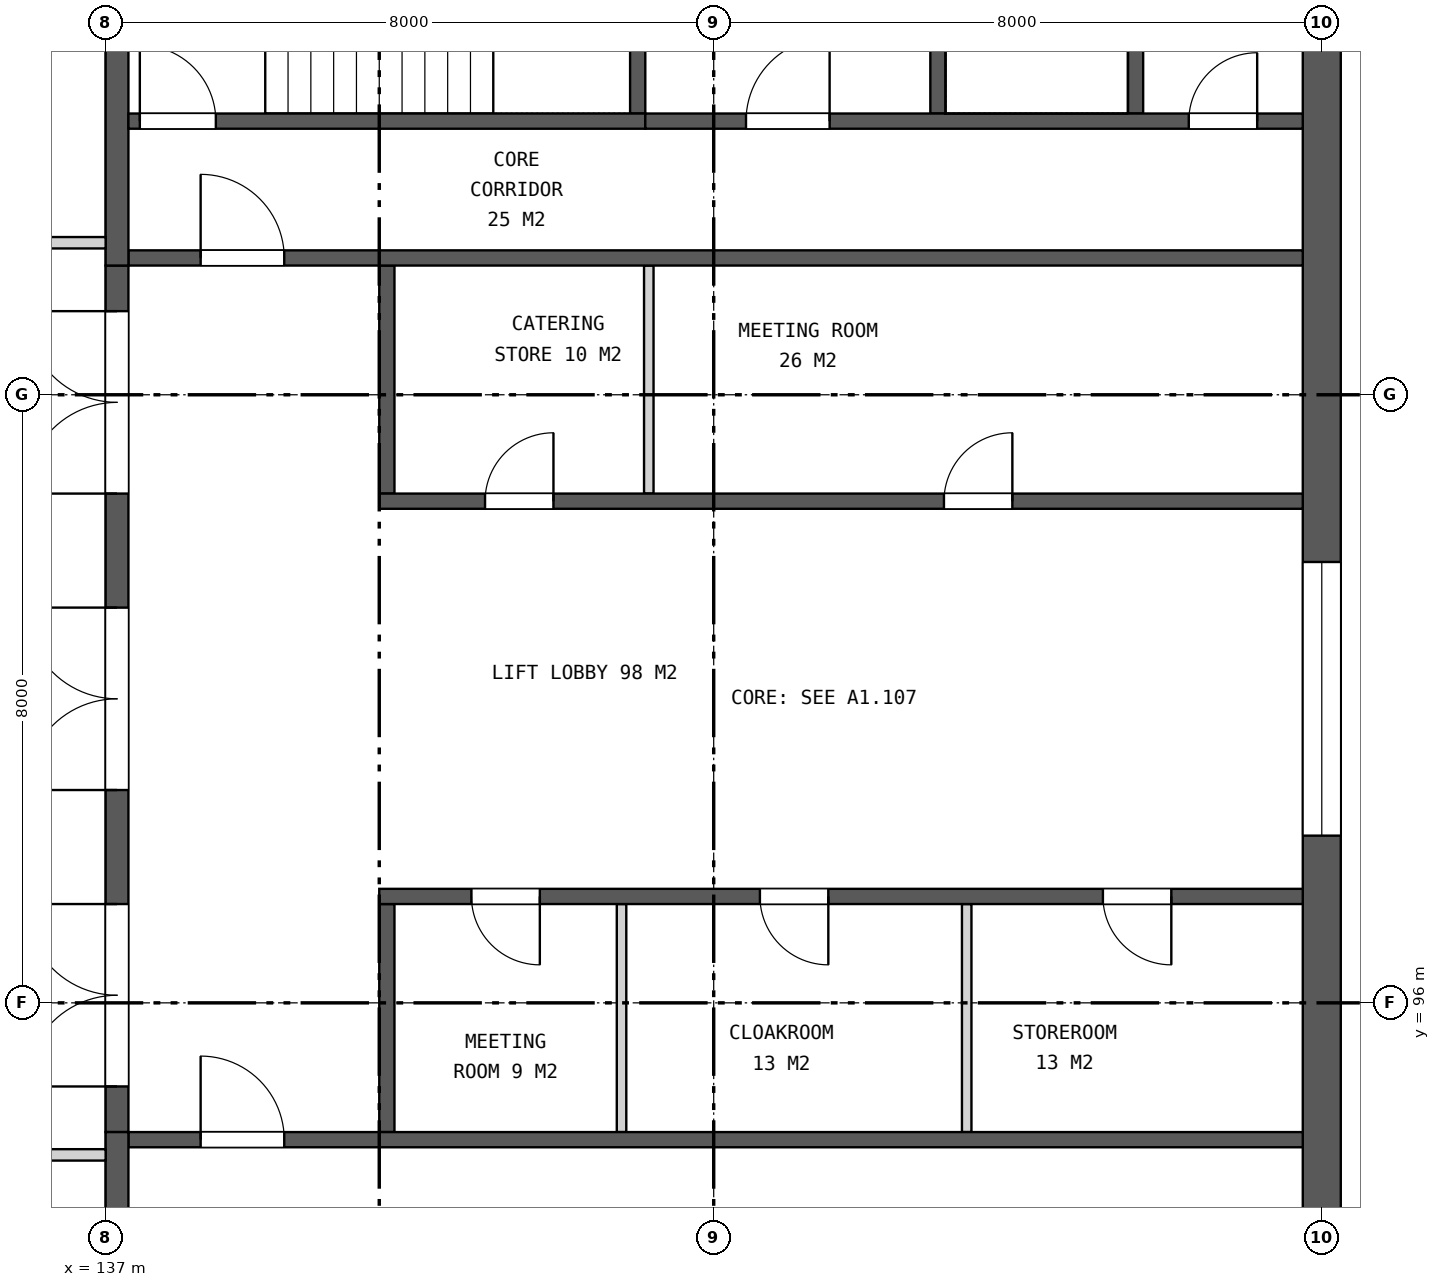
"""IFC4 building model, lengths in metres.
Left out: names, types, materials, properties, quantities, classifications, styles, units other than length and angle.
Written with IfcOpenShell. Run it as: python <this file> out.ifc"""

import sys

from ifc_helpers import new_model, si_unit, direction, frame, frame_2d, origin, place, context, subcontext, project, spatial, rectangle, extrude, element, fill, save


model = new_model("IFC4")
c1 = context("Model", 3, precision=1e-05, world=origin(), true_north=direction((0.0, 1.0)))
c2 = subcontext(c1, "Body", "Model", "MODEL_VIEW")
j1 = project(units=[si_unit("LENGTHUNIT", "METRE"), si_unit("PLANEANGLEUNIT", "RADIAN")], contexts=[c1])
p1 = place(None, origin())
s1 = spatial("IfcSite", under=j1, at=p1, CompositionType="ELEMENT")
p2 = place(p1, origin())
s2 = spatial("IfcBuilding", under=s1, at=p2, CompositionType="ELEMENT")
p3 = place(p2, frame((0.0, 0.0, 344.9)))
s3 = spatial("IfcBuildingStorey", under=s2, at=p3, CompositionType="ELEMENT", Elevation=344.9)
p4 = place(p3, frame((153.0, 88.25, 0.0), z_axis=(0.0, 0.0, 1.0), x_axis=(0.0, 1.0, 0.0)))
e1 = element("IfcWall", 1, at=p4, inside=s3, PredefinedType="SHEAR", context=c2, shape_type="SweptSolid", body=[
    extrude(rectangle(XDim=23.5, YDim=0.5, at=frame_2d((11.75, 0.0))), origin(), (0.0, 0.0, 1.0), 4.2),
])
p5 = place(p4, frame((9.95, 0.0, 0.15)))
e2 = element("IfcOpeningElement", 2, at=p5, cuts=e1, PredefinedType="OPENING", context=c2, shape_type="SweptSolid", body=[
    extrude(rectangle(XDim=3.6, YDim=3.0, at=frame_2d((1.8, 1.5))), frame((0.0, 0.26, 0.0), z_axis=(0.0, -1.0, 0.0), x_axis=(1.0, 0.0, 0.0)), (0.0, 0.0, 1.0), 0.52),
])
p6 = place(p3, frame((137.15, 94.3, 0.0), z_axis=(0.0, 0.0, 1.0), x_axis=(0.0, 1.0, 0.0)))
e3 = element("IfcWall", 3, at=p6, inside=s3, PredefinedType="SHEAR", context=c2, shape_type="SweptSolid", body=[
    extrude(rectangle(XDim=11.4, YDim=0.3, at=frame_2d((5.7, 0.0))), origin(), (0.0, 0.0, 1.0), 4.2),
])
p7 = place(p6, frame((0.6, 0.0, 0.0)))
e4 = element("IfcOpeningElement", 4, at=p7, cuts=e3, PredefinedType="OPENING", context=c2, shape_type="SweptSolid", body=[
    extrude(rectangle(XDim=2.4, YDim=2.4, at=frame_2d((1.2, 1.2))), frame((0.0, 0.16, 0.0), z_axis=(0.0, -1.0, 0.0), x_axis=(1.0, 0.0, 0.0)), (0.0, 0.0, 1.0), 0.32),
])
p8 = place(p6, frame((4.5, 0.0, 0.0)))
e5 = element("IfcOpeningElement", 5, at=p8, cuts=e3, PredefinedType="OPENING", context=c2, shape_type="SweptSolid", body=[
    extrude(rectangle(XDim=2.4, YDim=2.4, at=frame_2d((1.2, 1.2))), frame((0.0, 0.16, 0.0), z_axis=(0.0, -1.0, 0.0), x_axis=(1.0, 0.0, 0.0)), (0.0, 0.0, 1.0), 0.32),
])
p9 = place(p6, frame((8.4, 0.0, 0.0)))
e6 = element("IfcOpeningElement", 6, at=p9, cuts=e3, PredefinedType="OPENING", context=c2, shape_type="SweptSolid", body=[
    extrude(rectangle(XDim=2.4, YDim=2.4, at=frame_2d((1.2, 1.2))), frame((0.0, 0.16, 0.0), z_axis=(0.0, -1.0, 0.0), x_axis=(1.0, 0.0, 0.0)), (0.0, 0.0, 1.0), 0.32),
])
p10 = place(p3, frame((140.7, 102.7, 0.0), z_axis=(0.0, 0.0, 1.0), x_axis=(0.0, 1.0, 0.0)))
e7 = element("IfcWall", 7, at=p10, inside=s3, PredefinedType="SHEAR", context=c2, shape_type="SweptSolid", body=[
    extrude(rectangle(XDim=3.0, YDim=0.2, at=frame_2d((1.5, 0.0))), origin(), (0.0, 0.0, 1.0), 4.2),
])
p11 = place(p3, frame((144.146, 102.7, 0.0), z_axis=(0.0, 0.0, 1.0), x_axis=(0.0, 1.0, 0.0)))
e8 = element("IfcWall", 8, at=p11, inside=s3, PredefinedType="PARTITIONING", context=c2, shape_type="SweptSolid", body=[
    extrude(rectangle(XDim=3.0, YDim=0.125, at=frame_2d((1.5, 0.0))), origin(), (0.0, 0.0, 1.0), 4.2),
])
p12 = place(p3, frame((140.6, 102.6, 0.0), z_axis=(0.0, 0.0, 1.0), x_axis=(1.0, 0.0, 0.0)))
e9 = element("IfcWall", 9, at=p12, inside=s3, PredefinedType="SHEAR", context=c2, shape_type="SweptSolid", body=[
    extrude(rectangle(XDim=12.15, YDim=0.2, at=frame_2d((6.075, 0.0))), origin(), (0.0, 0.0, 1.0), 4.2),
])
p13 = place(p12, frame((1.392, 0.0, 0.0)))
e10 = element("IfcOpeningElement", 10, at=p13, cuts=e9, PredefinedType="OPENING", context=c2, shape_type="SweptSolid", body=[
    extrude(rectangle(XDim=0.9, YDim=2.1, at=frame_2d((0.45, 1.05))), frame((0.0, 0.11, 0.0), z_axis=(0.0, -1.0, 0.0), x_axis=(1.0, 0.0, 0.0)), (0.0, 0.0, 1.0), 0.22),
])
p14 = place(p12, frame((7.429, 0.0, 0.0)))
e11 = element("IfcOpeningElement", 11, at=p14, cuts=e9, PredefinedType="OPENING", context=c2, shape_type="SweptSolid", body=[
    extrude(rectangle(XDim=0.9, YDim=2.1, at=frame_2d((0.45, 1.05))), frame((0.0, 0.11, 0.0), z_axis=(0.0, -1.0, 0.0), x_axis=(1.0, 0.0, 0.0)), (0.0, 0.0, 1.0), 0.22),
])
p15 = place(p3, frame((140.7, 94.3, 0.0), z_axis=(0.0, 0.0, 1.0), x_axis=(0.0, 1.0, 0.0)))
e12 = element("IfcWall", 12, at=p15, inside=s3, PredefinedType="SHEAR", context=c2, shape_type="SweptSolid", body=[
    extrude(rectangle(XDim=3.0, YDim=0.2, at=frame_2d((1.5, 0.0))), origin(), (0.0, 0.0, 1.0), 4.2),
])
for number, where, z_axis, x_axis in (
    (13, (143.788, 94.3, 0.0), (0.0, 0.0, 1.0), (0.0, 1.0, 0.0)),
    (14, (148.329, 94.3, 0.0), (0.0, 0.0, 1.0), (0.0, 1.0, 0.0)),
):
    element("IfcWall", number, at=place(p3, frame(where, z_axis=z_axis, x_axis=x_axis)), inside=s3, PredefinedType="PARTITIONING", context=c2, shape_type="SweptSolid", body=[
        extrude(rectangle(XDim=3.0, YDim=0.125, at=frame_2d((1.5, 0.0))), origin(), (0.0, 0.0, 1.0), 4.2),
    ])
p16 = place(p3, frame((140.6, 97.4, 0.0), z_axis=(0.0, 0.0, 1.0), x_axis=(1.0, 0.0, 0.0)))
e15 = element("IfcWall", 15, at=p16, inside=s3, PredefinedType="SHEAR", context=c2, shape_type="SweptSolid", body=[
    extrude(rectangle(XDim=12.15, YDim=0.2, at=frame_2d((6.075, 0.0))), origin(), (0.0, 0.0, 1.0), 4.2),
])
p17 = place(p16, frame((1.212, 0.0, 0.0)))
e16 = element("IfcOpeningElement", 16, at=p17, cuts=e15, PredefinedType="OPENING", context=c2, shape_type="SweptSolid", body=[
    extrude(rectangle(XDim=0.9, YDim=2.1, at=frame_2d((0.45, 1.05))), frame((0.0, 0.11, 0.0), z_axis=(0.0, -1.0, 0.0), x_axis=(1.0, 0.0, 0.0)), (0.0, 0.0, 1.0), 0.22),
])
p18 = place(p16, frame((5.008, 0.0, 0.0)))
e17 = element("IfcOpeningElement", 17, at=p18, cuts=e15, PredefinedType="OPENING", context=c2, shape_type="SweptSolid", body=[
    extrude(rectangle(XDim=0.9, YDim=2.1, at=frame_2d((0.45, 1.05))), frame((0.0, 0.11, 0.0), z_axis=(0.0, -1.0, 0.0), x_axis=(1.0, 0.0, 0.0)), (0.0, 0.0, 1.0), 0.22),
])
p19 = place(p16, frame((9.521, 0.0, 0.0)))
e18 = element("IfcOpeningElement", 18, at=p19, cuts=e15, PredefinedType="OPENING", context=c2, shape_type="SweptSolid", body=[
    extrude(rectangle(XDim=0.9, YDim=2.1, at=frame_2d((0.45, 1.05))), frame((0.0, 0.11, 0.0), z_axis=(0.0, -1.0, 0.0), x_axis=(1.0, 0.0, 0.0)), (0.0, 0.0, 1.0), 0.22),
])
p20 = place(p3, frame((137.3, 105.8, 0.0), z_axis=(0.0, 0.0, 1.0), x_axis=(1.0, 0.0, 0.0)))
e19 = element("IfcWall", 19, at=p20, inside=s3, PredefinedType="SHEAR", context=c2, shape_type="SweptSolid", body=[
    extrude(rectangle(XDim=15.45, YDim=0.2, at=frame_2d((7.725, 0.0))), origin(), (0.0, 0.0, 1.0), 4.2),
])
p21 = place(p20, frame((0.95, 0.0, 0.0)))
e20 = element("IfcOpeningElement", 20, at=p21, cuts=e19, PredefinedType="OPENING", context=c2, shape_type="SweptSolid", body=[
    extrude(rectangle(XDim=1.1, YDim=2.1, at=frame_2d((0.55, 1.05))), frame((0.0, 0.11, 0.0), z_axis=(0.0, -1.0, 0.0), x_axis=(1.0, 0.0, 0.0)), (0.0, 0.0, 1.0), 0.22),
])
p22 = place(p3, frame((137.15, 105.7, 0.0), z_axis=(0.0, 0.0, 1.0), x_axis=(0.0, 1.0, 0.0)))
e21 = element("IfcWall", 21, at=p22, inside=s3, PredefinedType="SHEAR", context=c2, shape_type="SweptSolid", body=[
    extrude(rectangle(XDim=6.05, YDim=0.3, at=frame_2d((3.025, 0.0))), origin(), (0.0, 0.0, 1.0), 4.2),
])
p23 = place(p3, frame((144.0, 107.7, 0.0), z_axis=(0.0, 0.0, 1.0), x_axis=(0.0, 1.0, 0.0)))
e22 = element("IfcWall", 22, at=p23, inside=s3, PredefinedType="SHEAR", context=c2, shape_type="SweptSolid", body=[
    extrude(rectangle(XDim=4.05, YDim=0.2, at=frame_2d((2.025, 0.0))), origin(), (0.0, 0.0, 1.0), 4.2),
])
p24 = place(p3, frame((147.95, 107.7, 0.0), z_axis=(0.0, 0.0, 1.0), x_axis=(0.0, 1.0, 0.0)))
e23 = element("IfcWall", 23, at=p24, inside=s3, PredefinedType="SHEAR", context=c2, shape_type="SweptSolid", body=[
    extrude(rectangle(XDim=4.05, YDim=0.2, at=frame_2d((2.025, 0.0))), origin(), (0.0, 0.0, 1.0), 4.2),
])
p25 = place(p24, frame((1.425, 0.0, 0.0)))
e24 = element("IfcOpeningElement", 24, at=p25, cuts=e23, PredefinedType="OPENING", context=c2, shape_type="SweptSolid", body=[
    extrude(rectangle(XDim=1.2, YDim=2.1, at=frame_2d((0.6, 1.05))), frame((0.0, 0.11, 0.0), z_axis=(0.0, -1.0, 0.0), x_axis=(1.0, 0.0, 0.0)), (0.0, 0.0, 1.0), 0.22),
])
p26 = place(p3, frame((150.55, 107.7, 0.0), z_axis=(0.0, 0.0, 1.0), x_axis=(0.0, 1.0, 0.0)))
e25 = element("IfcWall", 25, at=p26, inside=s3, PredefinedType="SHEAR", context=c2, shape_type="SweptSolid", body=[
    extrude(rectangle(XDim=4.05, YDim=0.2, at=frame_2d((2.025, 0.0))), origin(), (0.0, 0.0, 1.0), 4.2),
])
p27 = place(p3, frame((137.3, 107.6, 0.0), z_axis=(0.0, 0.0, 1.0), x_axis=(1.0, 0.0, 0.0)))
e26 = element("IfcWall", 26, at=p27, inside=s3, PredefinedType="SHEAR", context=c2, shape_type="SweptSolid", body=[
    extrude(rectangle(XDim=6.8, YDim=0.2, at=frame_2d((3.4, 0.0))), origin(), (0.0, 0.0, 1.0), 4.2),
])
p28 = place(p27, frame((0.15, 0.0, 0.0)))
e27 = element("IfcOpeningElement", 27, at=p28, cuts=e26, PredefinedType="OPENING", context=c2, shape_type="SweptSolid", body=[
    extrude(rectangle(XDim=1.0, YDim=2.1, at=frame_2d((0.5, 1.05))), frame((0.0, 0.11, 0.0), z_axis=(0.0, -1.0, 0.0), x_axis=(1.0, 0.0, 0.0)), (0.0, 0.0, 1.0), 0.22),
])
p29 = place(p3, frame((144.1, 107.6, 0.0), z_axis=(0.0, 0.0, 1.0), x_axis=(1.0, 0.0, 0.0)))
e28 = element("IfcWall", 28, at=p29, inside=s3, PredefinedType="SHEAR", context=c2, shape_type="SweptSolid", body=[
    extrude(rectangle(XDim=8.65, YDim=0.2, at=frame_2d((4.325, 0.0))), origin(), (0.0, 0.0, 1.0), 4.2),
])
p30 = place(p29, frame((1.325, 0.0, 0.0)))
e29 = element("IfcOpeningElement", 29, at=p30, cuts=e28, PredefinedType="OPENING", context=c2, shape_type="SweptSolid", body=[
    extrude(rectangle(XDim=1.1, YDim=2.1, at=frame_2d((0.55, 1.05))), frame((0.0, 0.11, 0.0), z_axis=(0.0, -1.0, 0.0), x_axis=(1.0, 0.0, 0.0)), (0.0, 0.0, 1.0), 0.22),
])
p31 = place(p29, frame((7.15, 0.0, 0.0)))
e30 = element("IfcOpeningElement", 30, at=p31, cuts=e28, PredefinedType="OPENING", context=c2, shape_type="SweptSolid", body=[
    extrude(rectangle(XDim=0.9, YDim=2.1, at=frame_2d((0.45, 1.05))), frame((0.0, 0.11, 0.0), z_axis=(0.0, -1.0, 0.0), x_axis=(1.0, 0.0, 0.0)), (0.0, 0.0, 1.0), 0.22),
])
p32 = place(p3, frame((137.3, 94.2, 0.0), z_axis=(0.0, 0.0, 1.0), x_axis=(1.0, 0.0, 0.0)))
e31 = element("IfcWall", 31, at=p32, inside=s3, PredefinedType="SHEAR", context=c2, shape_type="SweptSolid", body=[
    extrude(rectangle(XDim=15.45, YDim=0.2, at=frame_2d((7.725, 0.0))), origin(), (0.0, 0.0, 1.0), 4.2),
])
p33 = place(p32, frame((0.95, 0.0, 0.0)))
e32 = element("IfcOpeningElement", 32, at=p33, cuts=e31, PredefinedType="OPENING", context=c2, shape_type="SweptSolid", body=[
    extrude(rectangle(XDim=1.1, YDim=2.1, at=frame_2d((0.55, 1.05))), frame((0.0, 0.11, 0.0), z_axis=(0.0, -1.0, 0.0), x_axis=(1.0, 0.0, 0.0)), (0.0, 0.0, 1.0), 0.22),
])
p34 = place(p3, frame((137.15, 88.25, 0.0), z_axis=(0.0, 0.0, 1.0), x_axis=(0.0, 1.0, 0.0)))
e33 = element("IfcWall", 33, at=p34, inside=s3, PredefinedType="SHEAR", context=c2, shape_type="SweptSolid", body=[
    extrude(rectangle(XDim=6.05, YDim=0.3, at=frame_2d((3.025, 0.0))), origin(), (0.0, 0.0, 1.0), 4.2),
])
for number, where, z_axis, x_axis in (
    (34, (131.475, 94.0, 0.0), (0.0, 0.0, 1.0), (1.0, 0.0, 0.0)),
    (35, (131.475, 106.0, 0.0), (0.0, 0.0, 1.0), (1.0, 0.0, 0.0)),
):
    element("IfcWall", number, at=place(p3, frame(where, z_axis=z_axis, x_axis=x_axis)), inside=s3, PredefinedType="PARTITIONING", context=c2, shape_type="SweptSolid", body=[
        extrude(rectangle(XDim=5.525, YDim=0.15, at=frame_2d((2.762, 0.0))), origin(), (0.0, 0.0, 1.0), 3.396),
    ])
p35 = place(p5, origin())
e36 = element("IfcWindow", 36, at=p35, inside=s3, PartitioningType="SINGLE_PANEL", PredefinedType="WINDOW", context=c2, shape_type="SweptSolid", body=[
    extrude(rectangle(XDim=3.6, YDim=3.0, at=frame_2d((1.8, 1.5))), frame((0.0, 0.03, 0.0), z_axis=(0.0, -1.0, 0.0), x_axis=(1.0, 0.0, 0.0)), (0.0, 0.0, 1.0), 0.06),
])
fill(e2, e36)
p36 = place(p7, origin())
e37 = element("IfcDoor", 37, at=p36, inside=s3, OperationType="DOUBLE_DOOR_SINGLE_SWING", PredefinedType="DOOR", context=c2, shape_type="SweptSolid", body=[
    extrude(rectangle(XDim=2.4, YDim=2.4, at=frame_2d((1.2, 1.2))), frame((0.0, 0.025, 0.0), z_axis=(0.0, -1.0, 0.0), x_axis=(1.0, 0.0, 0.0)), (0.0, 0.0, 1.0), 0.05),
])
fill(e4, e37)
p37 = place(p8, origin())
e38 = element("IfcDoor", 38, at=p37, inside=s3, OperationType="DOUBLE_DOOR_SINGLE_SWING", PredefinedType="DOOR", context=c2, shape_type="SweptSolid", body=[
    extrude(rectangle(XDim=2.4, YDim=2.4, at=frame_2d((1.2, 1.2))), frame((0.0, 0.025, 0.0), z_axis=(0.0, -1.0, 0.0), x_axis=(1.0, 0.0, 0.0)), (0.0, 0.0, 1.0), 0.05),
])
fill(e5, e38)
p38 = place(p9, origin())
e39 = element("IfcDoor", 39, at=p38, inside=s3, OperationType="DOUBLE_DOOR_SINGLE_SWING", PredefinedType="DOOR", context=c2, shape_type="SweptSolid", body=[
    extrude(rectangle(XDim=2.4, YDim=2.4, at=frame_2d((1.2, 1.2))), frame((0.0, 0.025, 0.0), z_axis=(0.0, -1.0, 0.0), x_axis=(1.0, 0.0, 0.0)), (0.0, 0.0, 1.0), 0.05),
])
fill(e6, e39)
p39 = place(p13, origin())
e40 = element("IfcDoor", 40, at=p39, inside=s3, OperationType="SINGLE_SWING_RIGHT", PredefinedType="DOOR", context=c2, shape_type="SweptSolid", body=[
    extrude(rectangle(XDim=0.9, YDim=2.1, at=frame_2d((0.45, 1.05))), frame((0.0, 0.025, 0.0), z_axis=(0.0, -1.0, 0.0), x_axis=(1.0, 0.0, 0.0)), (0.0, 0.0, 1.0), 0.05),
])
fill(e10, e40)
p40 = place(p14, origin())
e41 = element("IfcDoor", 41, at=p40, inside=s3, OperationType="SINGLE_SWING_RIGHT", PredefinedType="DOOR", context=c2, shape_type="SweptSolid", body=[
    extrude(rectangle(XDim=0.9, YDim=2.1, at=frame_2d((0.45, 1.05))), frame((0.0, 0.025, 0.0), z_axis=(0.0, -1.0, 0.0), x_axis=(1.0, 0.0, 0.0)), (0.0, 0.0, 1.0), 0.05),
])
fill(e11, e41)
p41 = place(p17, frame((0.9, 0.0, 0.0), z_axis=(0.0, 0.0, 1.0), x_axis=(-1.0, 0.0, 0.0)))
e42 = element("IfcDoor", 42, at=p41, inside=s3, OperationType="SINGLE_SWING_LEFT", PredefinedType="DOOR", context=c2, shape_type="SweptSolid", body=[
    extrude(rectangle(XDim=0.9, YDim=2.1, at=frame_2d((0.45, 1.05))), frame((0.0, 0.025, 0.0), z_axis=(0.0, -1.0, 0.0), x_axis=(1.0, 0.0, 0.0)), (0.0, 0.0, 1.0), 0.05),
])
fill(e16, e42)
p42 = place(p18, frame((0.9, 0.0, 0.0), z_axis=(0.0, 0.0, 1.0), x_axis=(-1.0, 0.0, 0.0)))
e43 = element("IfcDoor", 43, at=p42, inside=s3, OperationType="SINGLE_SWING_LEFT", PredefinedType="DOOR", context=c2, shape_type="SweptSolid", body=[
    extrude(rectangle(XDim=0.9, YDim=2.1, at=frame_2d((0.45, 1.05))), frame((0.0, 0.025, 0.0), z_axis=(0.0, -1.0, 0.0), x_axis=(1.0, 0.0, 0.0)), (0.0, 0.0, 1.0), 0.05),
])
fill(e17, e43)
p43 = place(p19, frame((0.9, 0.0, 0.0), z_axis=(0.0, 0.0, 1.0), x_axis=(-1.0, 0.0, 0.0)))
e44 = element("IfcDoor", 44, at=p43, inside=s3, OperationType="SINGLE_SWING_LEFT", PredefinedType="DOOR", context=c2, shape_type="SweptSolid", body=[
    extrude(rectangle(XDim=0.9, YDim=2.1, at=frame_2d((0.45, 1.05))), frame((0.0, 0.025, 0.0), z_axis=(0.0, -1.0, 0.0), x_axis=(1.0, 0.0, 0.0)), (0.0, 0.0, 1.0), 0.05),
])
fill(e18, e44)
p44 = place(p21, origin())
e45 = element("IfcDoor", 45, at=p44, inside=s3, OperationType="SINGLE_SWING_LEFT", PredefinedType="DOOR", context=c2, shape_type="SweptSolid", body=[
    extrude(rectangle(XDim=1.1, YDim=2.1, at=frame_2d((0.55, 1.05))), frame((0.0, 0.025, 0.0), z_axis=(0.0, -1.0, 0.0), x_axis=(1.0, 0.0, 0.0)), (0.0, 0.0, 1.0), 0.05),
])
fill(e20, e45)
p45 = place(p28, origin())
e46 = element("IfcDoor", 46, at=p45, inside=s3, OperationType="SINGLE_SWING_LEFT", PredefinedType="DOOR", context=c2, shape_type="SweptSolid", body=[
    extrude(rectangle(XDim=1.0, YDim=2.1, at=frame_2d((0.5, 1.05))), frame((0.0, 0.025, 0.0), z_axis=(0.0, -1.0, 0.0), x_axis=(1.0, 0.0, 0.0)), (0.0, 0.0, 1.0), 0.05),
])
fill(e27, e46)
p46 = place(p30, origin())
e47 = element("IfcDoor", 47, at=p46, inside=s3, OperationType="SINGLE_SWING_RIGHT", PredefinedType="DOOR", context=c2, shape_type="SweptSolid", body=[
    extrude(rectangle(XDim=1.1, YDim=2.1, at=frame_2d((0.55, 1.05))), frame((0.0, 0.025, 0.0), z_axis=(0.0, -1.0, 0.0), x_axis=(1.0, 0.0, 0.0)), (0.0, 0.0, 1.0), 0.05),
])
fill(e29, e47)
p47 = place(p31, origin())
e48 = element("IfcDoor", 48, at=p47, inside=s3, OperationType="SINGLE_SWING_RIGHT", PredefinedType="DOOR", context=c2, shape_type="SweptSolid", body=[
    extrude(rectangle(XDim=0.9, YDim=2.1, at=frame_2d((0.45, 1.05))), frame((0.0, 0.025, 0.0), z_axis=(0.0, -1.0, 0.0), x_axis=(1.0, 0.0, 0.0)), (0.0, 0.0, 1.0), 0.05),
])
fill(e30, e48)
p48 = place(p33, origin())
e49 = element("IfcDoor", 49, at=p48, inside=s3, OperationType="SINGLE_SWING_LEFT", PredefinedType="DOOR", context=c2, shape_type="SweptSolid", body=[
    extrude(rectangle(XDim=1.1, YDim=2.1, at=frame_2d((0.55, 1.05))), frame((0.0, 0.025, 0.0), z_axis=(0.0, -1.0, 0.0), x_axis=(1.0, 0.0, 0.0)), (0.0, 0.0, 1.0), 0.05),
])
fill(e32, e49)
save(model, sys.argv[1])
